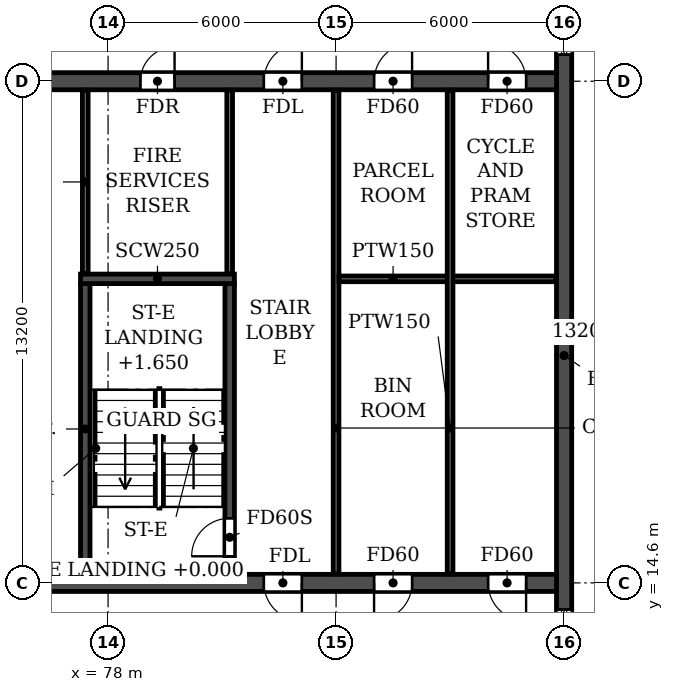
"""IFC4 building model, lengths in metres.
Left out: names, types, materials, properties, quantities, classifications, styles, units other than length and angle.
Written with IfcOpenShell. Run it as: python <this file> out.ifc"""

import sys

from ifc_helpers import new_model, si_unit, direction, frame, frame_2d, origin, place, context, subcontext, project, spatial, rectangle, extrude, element, fill, save


model = new_model("IFC4")
c1 = context("Model", 3, precision=1e-05, world=origin(), true_north=direction((0.0, 1.0)))
c2 = subcontext(c1, "Body", "Model", "MODEL_VIEW")
j1 = project(units=[si_unit("LENGTHUNIT", "METRE"), si_unit("PLANEANGLEUNIT", "RADIAN")], contexts=[c1])
p1 = place(None, origin())
s1 = spatial("IfcSite", under=j1, at=p1, CompositionType="ELEMENT")
p2 = place(p1, origin())
s2 = spatial("IfcBuilding", under=s1, at=p2, CompositionType="ELEMENT")
p3 = place(p2, frame((0.0, 0.0, 125.7)))
s3 = spatial("IfcBuildingStorey", under=s2, at=p3, CompositionType="ELEMENT", Elevation=125.7)
p4 = place(p3, frame((90.0, 4.683, 0.0), z_axis=(0.0, 0.0, 1.0), x_axis=(0.0, 1.0, 0.0)))
e1 = element("IfcWall", 1, at=p4, inside=s3, PredefinedType="SHEAR", context=c2, shape_type="SweptSolid", body=[
    extrude(rectangle(XDim=33.034, YDim=0.4, at=frame_2d((16.517, 0.0))), origin(), (0.0, 0.0, 1.0), 3.07),
])
p5 = place(p4, frame((23.817, 0.0, 0.9)))
e2 = element("IfcOpeningElement", 2, at=p5, cuts=e1, PredefinedType="OPENING", context=c2, shape_type="SweptSolid", body=[
    extrude(rectangle(XDim=1.2, YDim=1.5, at=frame_2d((0.6, 0.75))), frame((0.0, 0.21, 0.0), z_axis=(0.0, -1.0, 0.0), x_axis=(1.0, 0.0, 0.0)), (0.0, 0.0, 1.0), 0.42),
])
p6 = place(p4, frame((8.017, 0.0, 0.9)))
e3 = element("IfcOpeningElement", 3, at=p6, cuts=e1, PredefinedType="OPENING", context=c2, shape_type="SweptSolid", body=[
    extrude(rectangle(XDim=1.2, YDim=1.5, at=frame_2d((0.6, 0.75))), frame((0.0, 0.21, 0.0), z_axis=(0.0, -1.0, 0.0), x_axis=(1.0, 0.0, 0.0)), (0.0, 0.0, 1.0), 0.42),
])
p7 = place(p4, frame((28.293, 0.0, 0.6)))
e4 = element("IfcOpeningElement", 4, at=p7, cuts=e1, PredefinedType="OPENING", context=c2, shape_type="SweptSolid", body=[
    extrude(rectangle(XDim=2.2, YDim=1.8, at=frame_2d((1.1, 0.9))), frame((0.0, 0.21, 0.0), z_axis=(0.0, -1.0, 0.0), x_axis=(1.0, 0.0, 0.0)), (0.0, 0.0, 1.0), 0.42),
])
p8 = place(p4, frame((2.541, 0.0, 0.6)))
e5 = element("IfcOpeningElement", 5, at=p8, cuts=e1, PredefinedType="OPENING", context=c2, shape_type="SweptSolid", body=[
    extrude(rectangle(XDim=2.2, YDim=1.8, at=frame_2d((1.1, 0.9))), frame((0.0, 0.21, 0.0), z_axis=(0.0, -1.0, 0.0), x_axis=(1.0, 0.0, 0.0)), (0.0, 0.0, 1.0), 0.42),
])
p9 = place(p3, frame((12.2, 14.6, 0.0), z_axis=(0.0, 0.0, 1.0), x_axis=(1.0, 0.0, 0.0)))
e6 = element("IfcWall", 6, at=p9, inside=s3, PredefinedType="SOLIDWALL", context=c2, shape_type="SweptSolid", body=[
    extrude(rectangle(XDim=77.6, YDim=0.45, at=frame_2d((38.8, 0.0))), origin(), (0.0, 0.0, 1.0), 3.07),
])
p10 = place(p9, frame((0.8, 0.0, 0.0)))
e7 = element("IfcOpeningElement", 7, at=p10, cuts=e6, PredefinedType="OPENING", context=c2, shape_type="SweptSolid", body=[
    extrude(rectangle(XDim=1.0, YDim=2.1, at=frame_2d((0.5, 1.05))), frame((0.0, 0.235, 0.0), z_axis=(0.0, -1.0, 0.0), x_axis=(1.0, 0.0, 0.0)), (0.0, 0.0, 1.0), 0.47),
])
p11 = place(p9, frame((3.8, 0.0, 0.0)))
e8 = element("IfcOpeningElement", 8, at=p11, cuts=e6, PredefinedType="OPENING", context=c2, shape_type="SweptSolid", body=[
    extrude(rectangle(XDim=1.0, YDim=2.1, at=frame_2d((0.5, 1.05))), frame((0.0, 0.235, 0.0), z_axis=(0.0, -1.0, 0.0), x_axis=(1.0, 0.0, 0.0)), (0.0, 0.0, 1.0), 0.47),
])
p12 = place(p9, frame((6.7, 0.0, 0.0)))
e9 = element("IfcOpeningElement", 9, at=p12, cuts=e6, PredefinedType="OPENING", context=c2, shape_type="SweptSolid", body=[
    extrude(rectangle(XDim=1.0, YDim=2.1, at=frame_2d((0.5, 1.05))), frame((0.0, 0.235, 0.0), z_axis=(0.0, -1.0, 0.0), x_axis=(1.0, 0.0, 0.0)), (0.0, 0.0, 1.0), 0.47),
])
p13 = place(p9, frame((14.6, 0.0, 0.0)))
e10 = element("IfcOpeningElement", 10, at=p13, cuts=e6, PredefinedType="OPENING", context=c2, shape_type="SweptSolid", body=[
    extrude(rectangle(XDim=1.0, YDim=2.1, at=frame_2d((0.5, 1.05))), frame((0.0, 0.235, 0.0), z_axis=(0.0, -1.0, 0.0), x_axis=(1.0, 0.0, 0.0)), (0.0, 0.0, 1.0), 0.47),
])
p14 = place(p9, frame((19.2, 0.0, 0.0)))
e11 = element("IfcOpeningElement", 11, at=p14, cuts=e6, PredefinedType="OPENING", context=c2, shape_type="SweptSolid", body=[
    extrude(rectangle(XDim=1.0, YDim=2.1, at=frame_2d((0.5, 1.05))), frame((0.0, 0.235, 0.0), z_axis=(0.0, -1.0, 0.0), x_axis=(1.0, 0.0, 0.0)), (0.0, 0.0, 1.0), 0.47),
])
p15 = place(p9, frame((30.5, 0.0, 0.0)))
e12 = element("IfcOpeningElement", 12, at=p15, cuts=e6, PredefinedType="OPENING", context=c2, shape_type="SweptSolid", body=[
    extrude(rectangle(XDim=1.0, YDim=2.1, at=frame_2d((0.5, 1.05))), frame((0.0, 0.235, 0.0), z_axis=(0.0, -1.0, 0.0), x_axis=(1.0, 0.0, 0.0)), (0.0, 0.0, 1.0), 0.47),
])
p16 = place(p9, frame((34.4, 0.0, 0.0)))
e13 = element("IfcOpeningElement", 13, at=p16, cuts=e6, PredefinedType="OPENING", context=c2, shape_type="SweptSolid", body=[
    extrude(rectangle(XDim=1.0, YDim=2.1, at=frame_2d((0.5, 1.05))), frame((0.0, 0.235, 0.0), z_axis=(0.0, -1.0, 0.0), x_axis=(1.0, 0.0, 0.0)), (0.0, 0.0, 1.0), 0.47),
])
p17 = place(p9, frame((38.3, 0.0, 0.0)))
e14 = element("IfcOpeningElement", 14, at=p17, cuts=e6, PredefinedType="OPENING", context=c2, shape_type="SweptSolid", body=[
    extrude(rectangle(XDim=1.0, YDim=2.1, at=frame_2d((0.5, 1.05))), frame((0.0, 0.235, 0.0), z_axis=(0.0, -1.0, 0.0), x_axis=(1.0, 0.0, 0.0)), (0.0, 0.0, 1.0), 0.47),
])
p18 = place(p9, frame((40.9, 0.0, 0.0)))
e15 = element("IfcOpeningElement", 15, at=p18, cuts=e6, PredefinedType="OPENING", context=c2, shape_type="SweptSolid", body=[
    extrude(rectangle(XDim=1.0, YDim=2.1, at=frame_2d((0.5, 1.05))), frame((0.0, 0.235, 0.0), z_axis=(0.0, -1.0, 0.0), x_axis=(1.0, 0.0, 0.0)), (0.0, 0.0, 1.0), 0.47),
])
p19 = place(p9, frame((44.8, 0.0, 0.0)))
e16 = element("IfcOpeningElement", 16, at=p19, cuts=e6, PredefinedType="OPENING", context=c2, shape_type="SweptSolid", body=[
    extrude(rectangle(XDim=1.0, YDim=2.1, at=frame_2d((0.5, 1.05))), frame((0.0, 0.235, 0.0), z_axis=(0.0, -1.0, 0.0), x_axis=(1.0, 0.0, 0.0)), (0.0, 0.0, 1.0), 0.47),
])
p20 = place(p9, frame((57.4, 0.0, 0.0)))
e17 = element("IfcOpeningElement", 17, at=p20, cuts=e6, PredefinedType="OPENING", context=c2, shape_type="SweptSolid", body=[
    extrude(rectangle(XDim=1.0, YDim=2.1, at=frame_2d((0.5, 1.05))), frame((0.0, 0.235, 0.0), z_axis=(0.0, -1.0, 0.0), x_axis=(1.0, 0.0, 0.0)), (0.0, 0.0, 1.0), 0.47),
])
p21 = place(p9, frame((62.0, 0.0, 0.0)))
e18 = element("IfcOpeningElement", 18, at=p21, cuts=e6, PredefinedType="OPENING", context=c2, shape_type="SweptSolid", body=[
    extrude(rectangle(XDim=1.0, YDim=2.1, at=frame_2d((0.5, 1.05))), frame((0.0, 0.235, 0.0), z_axis=(0.0, -1.0, 0.0), x_axis=(1.0, 0.0, 0.0)), (0.0, 0.0, 1.0), 0.47),
])
p22 = place(p9, frame((69.9, 0.0, 0.0)))
e19 = element("IfcOpeningElement", 19, at=p22, cuts=e6, PredefinedType="OPENING", context=c2, shape_type="SweptSolid", body=[
    extrude(rectangle(XDim=1.0, YDim=2.1, at=frame_2d((0.5, 1.05))), frame((0.0, 0.235, 0.0), z_axis=(0.0, -1.0, 0.0), x_axis=(1.0, 0.0, 0.0)), (0.0, 0.0, 1.0), 0.47),
])
p23 = place(p9, frame((72.8, 0.0, 0.0)))
e20 = element("IfcOpeningElement", 20, at=p23, cuts=e6, PredefinedType="OPENING", context=c2, shape_type="SweptSolid", body=[
    extrude(rectangle(XDim=1.0, YDim=2.1, at=frame_2d((0.5, 1.05))), frame((0.0, 0.235, 0.0), z_axis=(0.0, -1.0, 0.0), x_axis=(1.0, 0.0, 0.0)), (0.0, 0.0, 1.0), 0.47),
])
p24 = place(p9, frame((75.8, 0.0, 0.0)))
e21 = element("IfcOpeningElement", 21, at=p24, cuts=e6, PredefinedType="OPENING", context=c2, shape_type="SweptSolid", body=[
    extrude(rectangle(XDim=1.0, YDim=2.1, at=frame_2d((0.5, 1.05))), frame((0.0, 0.235, 0.0), z_axis=(0.0, -1.0, 0.0), x_axis=(1.0, 0.0, 0.0)), (0.0, 0.0, 1.0), 0.47),
])
p25 = place(p3, frame((12.2, 27.8, 0.0), z_axis=(0.0, 0.0, 1.0), x_axis=(1.0, 0.0, 0.0)))
e22 = element("IfcWall", 22, at=p25, inside=s3, PredefinedType="SOLIDWALL", context=c2, shape_type="SweptSolid", body=[
    extrude(rectangle(XDim=77.6, YDim=0.45, at=frame_2d((38.8, 0.0))), origin(), (0.0, 0.0, 1.0), 3.07),
])
p26 = place(p25, frame((0.8, 0.0, 0.0)))
e23 = element("IfcOpeningElement", 23, at=p26, cuts=e22, PredefinedType="OPENING", context=c2, shape_type="SweptSolid", body=[
    extrude(rectangle(XDim=1.0, YDim=2.1, at=frame_2d((0.5, 1.05))), frame((0.0, 0.235, 0.0), z_axis=(0.0, -1.0, 0.0), x_axis=(1.0, 0.0, 0.0)), (0.0, 0.0, 1.0), 0.47),
])
p27 = place(p25, frame((3.8, 0.0, 0.0)))
e24 = element("IfcOpeningElement", 24, at=p27, cuts=e22, PredefinedType="OPENING", context=c2, shape_type="SweptSolid", body=[
    extrude(rectangle(XDim=1.0, YDim=2.1, at=frame_2d((0.5, 1.05))), frame((0.0, 0.235, 0.0), z_axis=(0.0, -1.0, 0.0), x_axis=(1.0, 0.0, 0.0)), (0.0, 0.0, 1.0), 0.47),
])
p28 = place(p25, frame((6.7, 0.0, 0.0)))
e25 = element("IfcOpeningElement", 25, at=p28, cuts=e22, PredefinedType="OPENING", context=c2, shape_type="SweptSolid", body=[
    extrude(rectangle(XDim=1.0, YDim=2.1, at=frame_2d((0.5, 1.05))), frame((0.0, 0.235, 0.0), z_axis=(0.0, -1.0, 0.0), x_axis=(1.0, 0.0, 0.0)), (0.0, 0.0, 1.0), 0.47),
])
p29 = place(p25, frame((10.05, 0.0, 0.0)))
e26 = element("IfcOpeningElement", 26, at=p29, cuts=e22, PredefinedType="OPENING", context=c2, shape_type="SweptSolid", body=[
    extrude(rectangle(XDim=0.9, YDim=2.1, at=frame_2d((0.45, 1.05))), frame((0.0, 0.235, 0.0), z_axis=(0.0, -1.0, 0.0), x_axis=(1.0, 0.0, 0.0)), (0.0, 0.0, 1.0), 0.47),
])
p30 = place(p25, frame((19.25, 0.0, 0.0)))
e27 = element("IfcOpeningElement", 27, at=p30, cuts=e22, PredefinedType="OPENING", context=c2, shape_type="SweptSolid", body=[
    extrude(rectangle(XDim=0.9, YDim=2.1, at=frame_2d((0.45, 1.05))), frame((0.0, 0.235, 0.0), z_axis=(0.0, -1.0, 0.0), x_axis=(1.0, 0.0, 0.0)), (0.0, 0.0, 1.0), 0.47),
])
p31 = place(p25, frame((25.0, 0.0, 0.0)))
e28 = element("IfcOpeningElement", 28, at=p31, cuts=e22, PredefinedType="OPENING", context=c2, shape_type="SweptSolid", body=[
    extrude(rectangle(XDim=1.0, YDim=2.1, at=frame_2d((0.5, 1.05))), frame((0.0, 0.235, 0.0), z_axis=(0.0, -1.0, 0.0), x_axis=(1.0, 0.0, 0.0)), (0.0, 0.0, 1.0), 0.47),
])
p32 = place(p25, frame((30.2, 0.0, 0.0)))
e29 = element("IfcOpeningElement", 29, at=p32, cuts=e22, PredefinedType="OPENING", context=c2, shape_type="SweptSolid", body=[
    extrude(rectangle(XDim=1.0, YDim=2.1, at=frame_2d((0.5, 1.05))), frame((0.0, 0.235, 0.0), z_axis=(0.0, -1.0, 0.0), x_axis=(1.0, 0.0, 0.0)), (0.0, 0.0, 1.0), 0.47),
])
p33 = place(p25, frame((35.4, 0.0, 0.0)))
e30 = element("IfcOpeningElement", 30, at=p33, cuts=e22, PredefinedType="OPENING", context=c2, shape_type="SweptSolid", body=[
    extrude(rectangle(XDim=1.0, YDim=2.1, at=frame_2d((0.5, 1.05))), frame((0.0, 0.235, 0.0), z_axis=(0.0, -1.0, 0.0), x_axis=(1.0, 0.0, 0.0)), (0.0, 0.0, 1.0), 0.47),
])
p34 = place(p25, frame((38.3, 0.0, 0.0)))
e31 = element("IfcOpeningElement", 31, at=p34, cuts=e22, PredefinedType="OPENING", context=c2, shape_type="SweptSolid", body=[
    extrude(rectangle(XDim=1.0, YDim=2.1, at=frame_2d((0.5, 1.05))), frame((0.0, 0.235, 0.0), z_axis=(0.0, -1.0, 0.0), x_axis=(1.0, 0.0, 0.0)), (0.0, 0.0, 1.0), 0.47),
])
p35 = place(p25, frame((42.5, 0.0, 0.0)))
e32 = element("IfcOpeningElement", 32, at=p35, cuts=e22, PredefinedType="OPENING", context=c2, shape_type="SweptSolid", body=[
    extrude(rectangle(XDim=1.0, YDim=2.1, at=frame_2d((0.5, 1.05))), frame((0.0, 0.235, 0.0), z_axis=(0.0, -1.0, 0.0), x_axis=(1.0, 0.0, 0.0)), (0.0, 0.0, 1.0), 0.47),
])
p36 = place(p25, frame((46.4, 0.0, 0.0)))
e33 = element("IfcOpeningElement", 33, at=p36, cuts=e22, PredefinedType="OPENING", context=c2, shape_type="SweptSolid", body=[
    extrude(rectangle(XDim=1.0, YDim=2.1, at=frame_2d((0.5, 1.05))), frame((0.0, 0.235, 0.0), z_axis=(0.0, -1.0, 0.0), x_axis=(1.0, 0.0, 0.0)), (0.0, 0.0, 1.0), 0.47),
])
p37 = place(p25, frame((49.0, 0.0, 0.0)))
e34 = element("IfcOpeningElement", 34, at=p37, cuts=e22, PredefinedType="OPENING", context=c2, shape_type="SweptSolid", body=[
    extrude(rectangle(XDim=1.0, YDim=2.1, at=frame_2d((0.5, 1.05))), frame((0.0, 0.235, 0.0), z_axis=(0.0, -1.0, 0.0), x_axis=(1.0, 0.0, 0.0)), (0.0, 0.0, 1.0), 0.47),
])
p38 = place(p25, frame((52.65, 0.0, 0.0)))
e35 = element("IfcOpeningElement", 35, at=p38, cuts=e22, PredefinedType="OPENING", context=c2, shape_type="SweptSolid", body=[
    extrude(rectangle(XDim=1.5, YDim=2.1, at=frame_2d((0.75, 1.05))), frame((0.0, 0.235, 0.0), z_axis=(0.0, -1.0, 0.0), x_axis=(1.0, 0.0, 0.0)), (0.0, 0.0, 1.0), 0.47),
])
p39 = place(p25, frame((57.45, 0.0, 0.0)))
e36 = element("IfcOpeningElement", 36, at=p39, cuts=e22, PredefinedType="OPENING", context=c2, shape_type="SweptSolid", body=[
    extrude(rectangle(XDim=0.9, YDim=2.1, at=frame_2d((0.45, 1.05))), frame((0.0, 0.235, 0.0), z_axis=(0.0, -1.0, 0.0), x_axis=(1.0, 0.0, 0.0)), (0.0, 0.0, 1.0), 0.47),
])
p40 = place(p25, frame((66.65, 0.0, 0.0)))
e37 = element("IfcOpeningElement", 37, at=p40, cuts=e22, PredefinedType="OPENING", context=c2, shape_type="SweptSolid", body=[
    extrude(rectangle(XDim=0.9, YDim=2.1, at=frame_2d((0.45, 1.05))), frame((0.0, 0.235, 0.0), z_axis=(0.0, -1.0, 0.0), x_axis=(1.0, 0.0, 0.0)), (0.0, 0.0, 1.0), 0.47),
])
p41 = place(p25, frame((69.9, 0.0, 0.0)))
e38 = element("IfcOpeningElement", 38, at=p41, cuts=e22, PredefinedType="OPENING", context=c2, shape_type="SweptSolid", body=[
    extrude(rectangle(XDim=1.0, YDim=2.1, at=frame_2d((0.5, 1.05))), frame((0.0, 0.235, 0.0), z_axis=(0.0, -1.0, 0.0), x_axis=(1.0, 0.0, 0.0)), (0.0, 0.0, 1.0), 0.47),
])
p42 = place(p25, frame((72.8, 0.0, 0.0)))
e39 = element("IfcOpeningElement", 39, at=p42, cuts=e22, PredefinedType="OPENING", context=c2, shape_type="SweptSolid", body=[
    extrude(rectangle(XDim=1.0, YDim=2.1, at=frame_2d((0.5, 1.05))), frame((0.0, 0.235, 0.0), z_axis=(0.0, -1.0, 0.0), x_axis=(1.0, 0.0, 0.0)), (0.0, 0.0, 1.0), 0.47),
])
p43 = place(p25, frame((75.8, 0.0, 0.0)))
e40 = element("IfcOpeningElement", 40, at=p43, cuts=e22, PredefinedType="OPENING", context=c2, shape_type="SweptSolid", body=[
    extrude(rectangle(XDim=1.0, YDim=2.1, at=frame_2d((0.5, 1.05))), frame((0.0, 0.235, 0.0), z_axis=(0.0, -1.0, 0.0), x_axis=(1.0, 0.0, 0.0)), (0.0, 0.0, 1.0), 0.47),
])
p44 = place(p3, frame((77.4, 14.825, 0.0), z_axis=(0.0, 0.0, 1.0), x_axis=(0.0, 1.0, 0.0)))
e41 = element("IfcWall", 41, at=p44, inside=s3, PredefinedType="SOLIDWALL", context=c2, shape_type="SweptSolid", body=[
    extrude(rectangle(XDim=7.65, YDim=0.25, at=frame_2d((3.825, 0.0))), origin(), (0.0, 0.0, 1.0), 3.07),
])
p45 = place(p3, frame((81.2, 14.825, 0.0), z_axis=(0.0, 0.0, 1.0), x_axis=(0.0, 1.0, 0.0)))
e42 = element("IfcWall", 42, at=p45, inside=s3, PredefinedType="SOLIDWALL", context=c2, shape_type="SweptSolid", body=[
    extrude(rectangle(XDim=7.65, YDim=0.25, at=frame_2d((3.825, 0.0))), origin(), (0.0, 0.0, 1.0), 3.07),
])
p46 = place(p45, frame((0.475, 0.0, 0.0)))
e43 = element("IfcOpeningElement", 43, at=p46, cuts=e42, PredefinedType="OPENING", context=c2, shape_type="SweptSolid", body=[
    extrude(rectangle(XDim=1.0, YDim=2.1, at=frame_2d((0.5, 1.05))), frame((0.0, 0.135, 0.0), z_axis=(0.0, -1.0, 0.0), x_axis=(1.0, 0.0, 0.0)), (0.0, 0.0, 1.0), 0.27),
])
p47 = place(p3, frame((77.275, 22.6, 0.0), z_axis=(0.0, 0.0, 1.0), x_axis=(1.0, 0.0, 0.0)))
e44 = element("IfcWall", 44, at=p47, inside=s3, PredefinedType="SOLIDWALL", context=c2, shape_type="SweptSolid", body=[
    extrude(rectangle(XDim=4.05, YDim=0.25, at=frame_2d((2.025, 0.0))), origin(), (0.0, 0.0, 1.0), 3.07),
])
p48 = place(p3, frame((84.0, 14.835, 0.0), z_axis=(0.0, 0.0, 1.0), x_axis=(0.0, 1.0, 0.0)))
e45 = element("IfcWall", 45, at=p48, inside=s3, PredefinedType="PARTITIONING", context=c2, shape_type="SweptSolid", body=[
    extrude(rectangle(XDim=12.73, YDim=0.15, at=frame_2d((6.365, 0.0))), origin(), (0.0, 0.0, 1.0), 3.07),
])
p49 = place(p3, frame((84.075, 22.6, 0.0), z_axis=(0.0, 0.0, 1.0), x_axis=(1.0, 0.0, 0.0)))
e46 = element("IfcWall", 46, at=p49, inside=s3, PredefinedType="PARTITIONING", context=c2, shape_type="SweptSolid", body=[
    extrude(rectangle(XDim=5.715, YDim=0.15, at=frame_2d((2.857, 0.0))), origin(), (0.0, 0.0, 1.0), 3.07),
])
p50 = place(p3, frame((87.0, 14.835, 0.0), z_axis=(0.0, 0.0, 1.0), x_axis=(0.0, 1.0, 0.0)))
e47 = element("IfcWall", 47, at=p50, inside=s3, PredefinedType="PARTITIONING", context=c2, shape_type="SweptSolid", body=[
    extrude(rectangle(XDim=12.73, YDim=0.15, at=frame_2d((6.365, 0.0))), origin(), (0.0, 0.0, 1.0), 3.07),
])
for number, where, z_axis, x_axis in (
    (48, (77.4, 22.735, 0.0), (0.0, 0.0, 1.0), (0.0, 1.0, 0.0)),
    (49, (81.2, 22.735, 0.0), (0.0, 0.0, 1.0), (0.0, 1.0, 0.0)),
):
    element("IfcWall", number, at=place(p3, frame(where, z_axis=z_axis, x_axis=x_axis)), inside=s3, PredefinedType="PARTITIONING", context=c2, shape_type="SweptSolid", body=[
        extrude(rectangle(XDim=4.83, YDim=0.15, at=frame_2d((2.415, 0.0))), origin(), (0.0, 0.0, 1.0), 3.07),
    ])
p51 = place(p5, origin())
e50 = element("IfcWindow", 50, at=p51, inside=s3, PartitioningType="SINGLE_PANEL", PredefinedType="WINDOW", context=c2, shape_type="SweptSolid", body=[
    extrude(rectangle(XDim=1.2, YDim=1.5, at=frame_2d((0.6, 0.75))), frame((0.0, 0.03, 0.0), z_axis=(0.0, -1.0, 0.0), x_axis=(1.0, 0.0, 0.0)), (0.0, 0.0, 1.0), 0.06),
])
fill(e2, e50)
p52 = place(p6, origin())
e51 = element("IfcWindow", 51, at=p52, inside=s3, PartitioningType="SINGLE_PANEL", PredefinedType="WINDOW", context=c2, shape_type="SweptSolid", body=[
    extrude(rectangle(XDim=1.2, YDim=1.5, at=frame_2d((0.6, 0.75))), frame((0.0, 0.03, 0.0), z_axis=(0.0, -1.0, 0.0), x_axis=(1.0, 0.0, 0.0)), (0.0, 0.0, 1.0), 0.06),
])
fill(e3, e51)
p53 = place(p40, origin())
e52 = element("IfcDoor", 52, at=p53, inside=s3, OperationType="SINGLE_SWING_RIGHT", PredefinedType="DOOR", context=c2, shape_type="SweptSolid", body=[
    extrude(rectangle(XDim=0.9, YDim=2.1, at=frame_2d((0.45, 1.05))), frame((0.0, 0.025, 0.0), z_axis=(0.0, -1.0, 0.0), x_axis=(1.0, 0.0, 0.0)), (0.0, 0.0, 1.0), 0.05),
])
fill(e37, e52)
p54 = place(p41, origin())
e53 = element("IfcDoor", 53, at=p54, inside=s3, OperationType="SINGLE_SWING_RIGHT", PredefinedType="DOOR", context=c2, shape_type="SweptSolid", body=[
    extrude(rectangle(XDim=1.0, YDim=2.1, at=frame_2d((0.5, 1.05))), frame((0.0, 0.025, 0.0), z_axis=(0.0, -1.0, 0.0), x_axis=(1.0, 0.0, 0.0)), (0.0, 0.0, 1.0), 0.05),
])
fill(e38, e53)
p55 = place(p42, origin())
e54 = element("IfcDoor", 54, at=p55, inside=s3, OperationType="SINGLE_SWING_RIGHT", PredefinedType="DOOR", context=c2, shape_type="SweptSolid", body=[
    extrude(rectangle(XDim=1.0, YDim=2.1, at=frame_2d((0.5, 1.05))), frame((0.0, 0.025, 0.0), z_axis=(0.0, -1.0, 0.0), x_axis=(1.0, 0.0, 0.0)), (0.0, 0.0, 1.0), 0.05),
])
fill(e39, e54)
p56 = place(p43, origin())
e55 = element("IfcDoor", 55, at=p56, inside=s3, OperationType="SINGLE_SWING_LEFT", PredefinedType="DOOR", context=c2, shape_type="SweptSolid", body=[
    extrude(rectangle(XDim=1.0, YDim=2.1, at=frame_2d((0.5, 1.05))), frame((0.0, 0.025, 0.0), z_axis=(0.0, -1.0, 0.0), x_axis=(1.0, 0.0, 0.0)), (0.0, 0.0, 1.0), 0.05),
])
fill(e40, e55)
p57 = place(p22, frame((1.0, 0.0, 0.0), z_axis=(0.0, 0.0, 1.0), x_axis=(-1.0, 0.0, 0.0)))
e56 = element("IfcDoor", 56, at=p57, inside=s3, OperationType="SINGLE_SWING_LEFT", PredefinedType="DOOR", context=c2, shape_type="SweptSolid", body=[
    extrude(rectangle(XDim=1.0, YDim=2.1, at=frame_2d((0.5, 1.05))), frame((0.0, 0.025, 0.0), z_axis=(0.0, -1.0, 0.0), x_axis=(1.0, 0.0, 0.0)), (0.0, 0.0, 1.0), 0.05),
])
fill(e19, e56)
p58 = place(p23, frame((1.0, 0.0, 0.0), z_axis=(0.0, 0.0, 1.0), x_axis=(-1.0, 0.0, 0.0)))
e57 = element("IfcDoor", 57, at=p58, inside=s3, OperationType="SINGLE_SWING_RIGHT", PredefinedType="DOOR", context=c2, shape_type="SweptSolid", body=[
    extrude(rectangle(XDim=1.0, YDim=2.1, at=frame_2d((0.5, 1.05))), frame((0.0, 0.025, 0.0), z_axis=(0.0, -1.0, 0.0), x_axis=(1.0, 0.0, 0.0)), (0.0, 0.0, 1.0), 0.05),
])
fill(e20, e57)
p59 = place(p24, frame((1.0, 0.0, 0.0), z_axis=(0.0, 0.0, 1.0), x_axis=(-1.0, 0.0, 0.0)))
e58 = element("IfcDoor", 58, at=p59, inside=s3, OperationType="SINGLE_SWING_LEFT", PredefinedType="DOOR", context=c2, shape_type="SweptSolid", body=[
    extrude(rectangle(XDim=1.0, YDim=2.1, at=frame_2d((0.5, 1.05))), frame((0.0, 0.025, 0.0), z_axis=(0.0, -1.0, 0.0), x_axis=(1.0, 0.0, 0.0)), (0.0, 0.0, 1.0), 0.05),
])
fill(e21, e58)
p60 = place(p46, origin())
e59 = element("IfcDoor", 59, at=p60, inside=s3, OperationType="SINGLE_SWING_LEFT", PredefinedType="DOOR", context=c2, shape_type="SweptSolid", body=[
    extrude(rectangle(XDim=1.0, YDim=2.1, at=frame_2d((0.5, 1.05))), frame((0.0, 0.025, 0.0), z_axis=(0.0, -1.0, 0.0), x_axis=(1.0, 0.0, 0.0)), (0.0, 0.0, 1.0), 0.05),
])
fill(e43, e59)
save(model, sys.argv[1])
